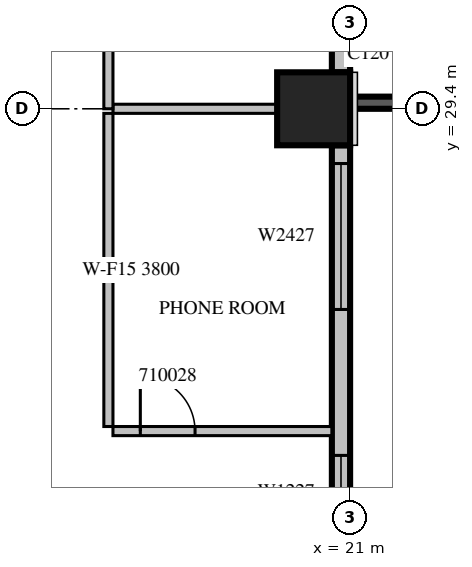
"""IFC4 building model, lengths in metres.
Left out: names, types, materials, properties, quantities, classifications, styles, units other than length and angle.
Written with IfcOpenShell. Run it as: python <this file> out.ifc"""

import sys

from ifc_helpers import new_model, si_unit, direction, frame, frame_2d, origin, origin_2d, place, context, subcontext, project, spatial, rectangle, extrude, source, transform, mapped, element, fill, save


model = new_model("IFC4")
c1 = context("Model", 3, precision=1e-05, world=origin(), true_north=direction((0.0, 1.0)))
c2 = subcontext(c1, "Body", "Model", "MODEL_VIEW")
j1 = project(units=[si_unit("LENGTHUNIT", "METRE"), si_unit("PLANEANGLEUNIT", "RADIAN")], contexts=[c1])
p1 = place(None, origin())
s1 = spatial("IfcSite", under=j1, at=p1, CompositionType="ELEMENT")
p2 = place(p1, origin())
s2 = spatial("IfcBuilding", under=s1, at=p2, CompositionType="ELEMENT")
p3 = place(p2, frame((0.0, 0.0, 53.1)))
s3 = spatial("IfcBuildingStorey", under=s2, at=p3, CompositionType="ELEMENT", Elevation=53.1)
m1 = source(origin(), c2, "Body", "SweptSolid", [
    extrude(rectangle(XDim=1.2, YDim=1.2, at=origin_2d()), origin(), (0.0, 0.0, 1.0), 4.2),
])
p4 = place(p3, frame((20.4, 29.4, 0.0), z_axis=(0.0, 0.0, 1.0), x_axis=(1.0, 0.0, 0.0)))
e1 = element("IfcColumn", 1, at=p4, inside=s3, PredefinedType="COLUMN", context=c2, shape_type="MappedRepresentation", body=[
    mapped(m1, transform((0.0, 0.0, 0.0), scale=1.0)),
])
m2 = source(origin(), c2, "Body", "SweptSolid", [
    extrude(rectangle(XDim=3.9, YDim=0.2, at=frame_2d((1.95, 0.0))), origin(), (0.0, 0.0, 1.0), 3.8),
])
p5 = place(p3, frame((21.0, 29.5, 0.0), z_axis=(0.0, 0.0, 1.0), x_axis=(1.0, 0.0, 0.0)))
e2 = element("IfcWall", 2, at=p5, inside=s3, PredefinedType="SOLIDWALL", context=c2, shape_type="MappedRepresentation", body=[
    mapped(m2, transform((0.0, 0.0, 0.0), scale=1.0)),
])
m3 = source(origin(), c2, "Body", "SweptSolid", [
    extrude(rectangle(XDim=2.4, YDim=2.7, at=frame_2d((1.2, 1.35))), frame((0.0, 0.11, 0.0), z_axis=(0.0, -1.0, 0.0), x_axis=(1.0, 0.0, 0.0)), (0.0, 0.0, 1.0), 0.22),
])
p6 = place(p5, frame((0.75, 0.0, 0.6)))
e3 = element("IfcOpeningElement", 3, at=p6, cuts=e2, PredefinedType="OPENING", context=c2, shape_type="MappedRepresentation", body=[
    mapped(m3, transform((0.0, 0.0, 0.0), scale=1.0)),
])
m4 = source(origin(), c2, "Body", "SweptSolid", [
    extrude(rectangle(XDim=6.6, YDim=0.3, at=frame_2d((3.3, 0.0))), origin(), (0.0, 0.0, 1.0), 3.8),
])
p7 = place(p3, frame((20.85, 22.2, 0.0), z_axis=(0.0, 0.0, 1.0), x_axis=(0.0, 1.0, 0.0)))
e4 = element("IfcWall", 4, at=p7, inside=s3, PredefinedType="STANDARD", context=c2, shape_type="MappedRepresentation", body=[
    mapped(m4, transform((0.0, 0.0, 0.0), scale=1.0)),
])
m5 = source(origin(), c2, "Body", "SweptSolid", [
    extrude(rectangle(XDim=1.2, YDim=2.7, at=frame_2d((0.6, 1.35))), frame((0.0, 0.16, 0.0), z_axis=(0.0, -1.0, 0.0), x_axis=(1.0, 0.0, 0.0)), (0.0, 0.0, 1.0), 0.32),
])
p8 = place(p7, frame((0.3, 0.0, 0.6)))
e5 = element("IfcOpeningElement", 5, at=p8, cuts=e4, PredefinedType="OPENING", context=c2, shape_type="MappedRepresentation", body=[
    mapped(m5, transform((0.0, 0.0, 0.0), scale=1.0)),
])
m6 = source(origin(), c2, "Body", "SweptSolid", [
    extrude(rectangle(XDim=2.4, YDim=2.7, at=frame_2d((1.2, 1.35))), frame((0.0, 0.16, 0.0), z_axis=(0.0, -1.0, 0.0), x_axis=(1.0, 0.0, 0.0)), (0.0, 0.0, 1.0), 0.32),
])
p9 = place(p7, frame((3.9, 0.0, 0.6)))
e6 = element("IfcOpeningElement", 6, at=p9, cuts=e4, PredefinedType="OPENING", context=c2, shape_type="MappedRepresentation", body=[
    mapped(m6, transform((0.0, 0.0, 0.0), scale=1.0)),
])
m7 = source(origin(), c2, "Body", "SweptSolid", [
    extrude(rectangle(XDim=7.2, YDim=0.3, at=frame_2d((3.6, 0.0))), origin(), (0.0, 0.0, 1.0), 3.8),
])
p10 = place(p3, frame((20.85, 30.0, 0.0), z_axis=(0.0, 0.0, 1.0), x_axis=(0.0, 1.0, 0.0)))
e7 = element("IfcWall", 7, at=p10, inside=s3, PredefinedType="STANDARD", context=c2, shape_type="MappedRepresentation", body=[
    mapped(m7, transform((0.0, 0.0, 0.0), scale=1.0)),
])
m8 = source(origin(), c2, "Body", "SweptSolid", [
    extrude(rectangle(XDim=1.0, YDim=2.1, at=frame_2d((0.5, 1.05))), frame((0.0, 0.16, 0.0), z_axis=(0.0, -1.0, 0.0), x_axis=(1.0, 0.0, 0.0)), (0.0, 0.0, 1.0), 0.32),
])
p11 = place(p10, frame((1.0, 0.0, 0.0)))
e8 = element("IfcOpeningElement", 8, at=p11, cuts=e7, PredefinedType="OPENING", context=c2, shape_type="MappedRepresentation", body=[
    mapped(m8, transform((0.0, 0.0, 0.0), scale=1.0)),
])
m9 = source(origin(), c2, "Body", "SweptSolid", [
    extrude(rectangle(XDim=3.6, YDim=0.15, at=frame_2d((1.8, 0.0))), origin(), (0.0, 0.0, 1.0), 3.8),
])
p12 = place(p3, frame((17.1, 24.1, 0.0), z_axis=(0.0, 0.0, 1.0), x_axis=(1.0, 0.0, 0.0)))
e9 = element("IfcWall", 9, at=p12, inside=s3, PredefinedType="PARTITIONING", context=c2, shape_type="MappedRepresentation", body=[
    mapped(m9, transform((0.0, 0.0, 0.0), scale=1.0)),
])
m10 = source(origin(), c2, "Body", "SweptSolid", [
    extrude(rectangle(XDim=0.9, YDim=2.1, at=frame_2d((0.45, 1.05))), frame((0.0, 0.085, 0.0), z_axis=(0.0, -1.0, 0.0), x_axis=(1.0, 0.0, 0.0)), (0.0, 0.0, 1.0), 0.17),
])
p13 = place(p12, frame((0.45, 0.0, 0.0)))
e10 = element("IfcOpeningElement", 10, at=p13, cuts=e9, PredefinedType="OPENING", context=c2, shape_type="MappedRepresentation", body=[
    mapped(m10, transform((0.0, 0.0, 0.0), scale=1.0)),
])
m11 = source(origin(), c2, "Body", "SweptSolid", [
    extrude(rectangle(XDim=5.15, YDim=0.15, at=frame_2d((2.575, 0.0))), origin(), (0.0, 0.0, 1.0), 3.8),
])
p14 = place(p3, frame((17.025, 29.325, 0.0), z_axis=(0.0, 0.0, 1.0), x_axis=(0.0, -1.0, 0.0)))
e11 = element("IfcWall", 11, at=p14, inside=s3, PredefinedType="PARTITIONING", context=c2, shape_type="MappedRepresentation", body=[
    mapped(m11, transform((0.0, 0.0, 0.0), scale=1.0)),
])
m12 = source(origin(), c2, "Body", "SweptSolid", [
    extrude(rectangle(XDim=2.701, YDim=0.15, at=frame_2d((1.351, 0.0))), origin(), (0.0, 0.0, 1.0), 3.8),
])
p15 = place(p3, frame((19.801, 29.4, 0.0), z_axis=(0.0, 0.0, 1.0), x_axis=(-1.0, 0.0, 0.0)))
e12 = element("IfcWall", 12, at=p15, inside=s3, PredefinedType="PARTITIONING", context=c2, shape_type="MappedRepresentation", body=[
    mapped(m12, transform((0.0, 0.0, 0.0), scale=1.0)),
])
m13 = source(origin(), c2, "Body", "SweptSolid", [
    extrude(rectangle(XDim=31.62, YDim=0.15, at=frame_2d((15.81, 0.0))), origin(), (0.0, 0.0, 1.0), 3.3),
])
p16 = place(p3, frame((17.025, 61.02, 0.0), z_axis=(0.0, 0.0, 1.0), x_axis=(0.0, -1.0, 0.0)))
e13 = element("IfcWall", 13, at=p16, inside=s3, PredefinedType="PARTITIONING", context=c2, shape_type="MappedRepresentation", body=[
    mapped(m13, transform((0.0, 0.0, 0.0), scale=1.0)),
])
m14 = source(origin(), c2, "Body", "SweptSolid", [
    extrude(rectangle(XDim=1.0, YDim=2.1, at=frame_2d((0.5, 1.05))), frame((0.0, 0.085, 0.0), z_axis=(0.0, -1.0, 0.0), x_axis=(1.0, 0.0, 0.0)), (0.0, 0.0, 1.0), 0.17),
])
p17 = place(p16, frame((29.263, 0.0, 0.0)))
e14 = element("IfcOpeningElement", 14, at=p17, cuts=e13, PredefinedType="OPENING", context=c2, shape_type="MappedRepresentation", body=[
    mapped(m14, transform((0.0, 0.0, 0.0), scale=1.0)),
])
p18 = place(p16, frame((25.951, 0.0, 0.0)))
e15 = element("IfcOpeningElement", 15, at=p18, cuts=e13, PredefinedType="OPENING", context=c2, shape_type="MappedRepresentation", body=[
    mapped(m14, transform((0.0, 0.0, 0.0), scale=1.0)),
])
p19 = place(p16, frame((23.608, 0.0, 0.0)))
e16 = element("IfcOpeningElement", 16, at=p19, cuts=e13, PredefinedType="OPENING", context=c2, shape_type="MappedRepresentation", body=[
    mapped(m14, transform((0.0, 0.0, 0.0), scale=1.0)),
])
p20 = place(p16, frame((20.863, 0.0, 0.0)))
e17 = element("IfcOpeningElement", 17, at=p20, cuts=e13, PredefinedType="OPENING", context=c2, shape_type="MappedRepresentation", body=[
    mapped(m14, transform((0.0, 0.0, 0.0), scale=1.0)),
])
p21 = place(p16, frame((17.551, 0.0, 0.0)))
e18 = element("IfcOpeningElement", 18, at=p21, cuts=e13, PredefinedType="OPENING", context=c2, shape_type="MappedRepresentation", body=[
    mapped(m14, transform((0.0, 0.0, 0.0), scale=1.0)),
])
p22 = place(p16, frame((15.208, 0.0, 0.0)))
e19 = element("IfcOpeningElement", 19, at=p22, cuts=e13, PredefinedType="OPENING", context=c2, shape_type="MappedRepresentation", body=[
    mapped(m14, transform((0.0, 0.0, 0.0), scale=1.0)),
])
p23 = place(p16, frame((12.677, 0.0, 0.0)))
e20 = element("IfcOpeningElement", 20, at=p23, cuts=e13, PredefinedType="OPENING", context=c2, shape_type="MappedRepresentation", body=[
    mapped(m10, transform((0.0, 0.0, 0.0), scale=1.0)),
])
p24 = place(p16, frame((9.737, 0.0, 0.0)))
e21 = element("IfcOpeningElement", 21, at=p24, cuts=e13, PredefinedType="OPENING", context=c2, shape_type="MappedRepresentation", body=[
    mapped(m10, transform((0.0, 0.0, 0.0), scale=1.0)),
])
p25 = place(p16, frame((6.236, 0.0, 0.0)))
e22 = element("IfcOpeningElement", 22, at=p25, cuts=e13, PredefinedType="OPENING", context=c2, shape_type="MappedRepresentation", body=[
    mapped(m10, transform((0.0, 0.0, 0.0), scale=1.0)),
])
p26 = place(p16, frame((1.729, 0.0, 0.0)))
e23 = element("IfcOpeningElement", 23, at=p26, cuts=e13, PredefinedType="OPENING", context=c2, shape_type="MappedRepresentation", body=[
    mapped(m10, transform((0.0, 0.0, 0.0), scale=1.0)),
])
m15 = source(origin(), c2, "Body", "SweptSolid", [
    extrude(rectangle(XDim=1.2, YDim=2.7, at=frame_2d((0.6, 1.35))), frame((0.0, 0.03, 0.0), z_axis=(0.0, -1.0, 0.0), x_axis=(1.0, 0.0, 0.0)), (0.0, 0.0, 1.0), 0.06),
])
p27 = place(p8, origin())
e24 = element("IfcWindow", 24, at=p27, inside=s3, PartitioningType="SINGLE_PANEL", PredefinedType="WINDOW", context=c2, shape_type="MappedRepresentation", body=[
    mapped(m15, transform((0.0, 0.0, 0.0), scale=1.0)),
])
fill(e5, e24)
m16 = source(origin(), c2, "Body", "SweptSolid", [
    extrude(rectangle(XDim=2.4, YDim=2.7, at=frame_2d((1.2, 1.35))), frame((0.0, 0.03, 0.0), z_axis=(0.0, -1.0, 0.0), x_axis=(1.0, 0.0, 0.0)), (0.0, 0.0, 1.0), 0.06),
])
p28 = place(p9, origin())
e25 = element("IfcWindow", 25, at=p28, inside=s3, PartitioningType="SINGLE_PANEL", PredefinedType="WINDOW", context=c2, shape_type="MappedRepresentation", body=[
    mapped(m16, transform((0.0, 0.0, 0.0), scale=1.0)),
])
fill(e6, e25)
m17 = source(origin(), c2, "Body", "SweptSolid", [
    extrude(rectangle(XDim=0.9, YDim=2.1, at=frame_2d((0.45, 1.05))), frame((0.0, 0.025, 0.0), z_axis=(0.0, -1.0, 0.0), x_axis=(1.0, 0.0, 0.0)), (0.0, 0.0, 1.0), 0.05),
])
p29 = place(p13, origin())
e26 = element("IfcDoor", 26, at=p29, inside=s3, OperationType="SINGLE_SWING_LEFT", PredefinedType="DOOR", context=c2, shape_type="MappedRepresentation", body=[
    mapped(m17, transform((0.0, 0.0, 0.0), scale=1.0)),
])
fill(e10, e26)
save(model, sys.argv[1])
